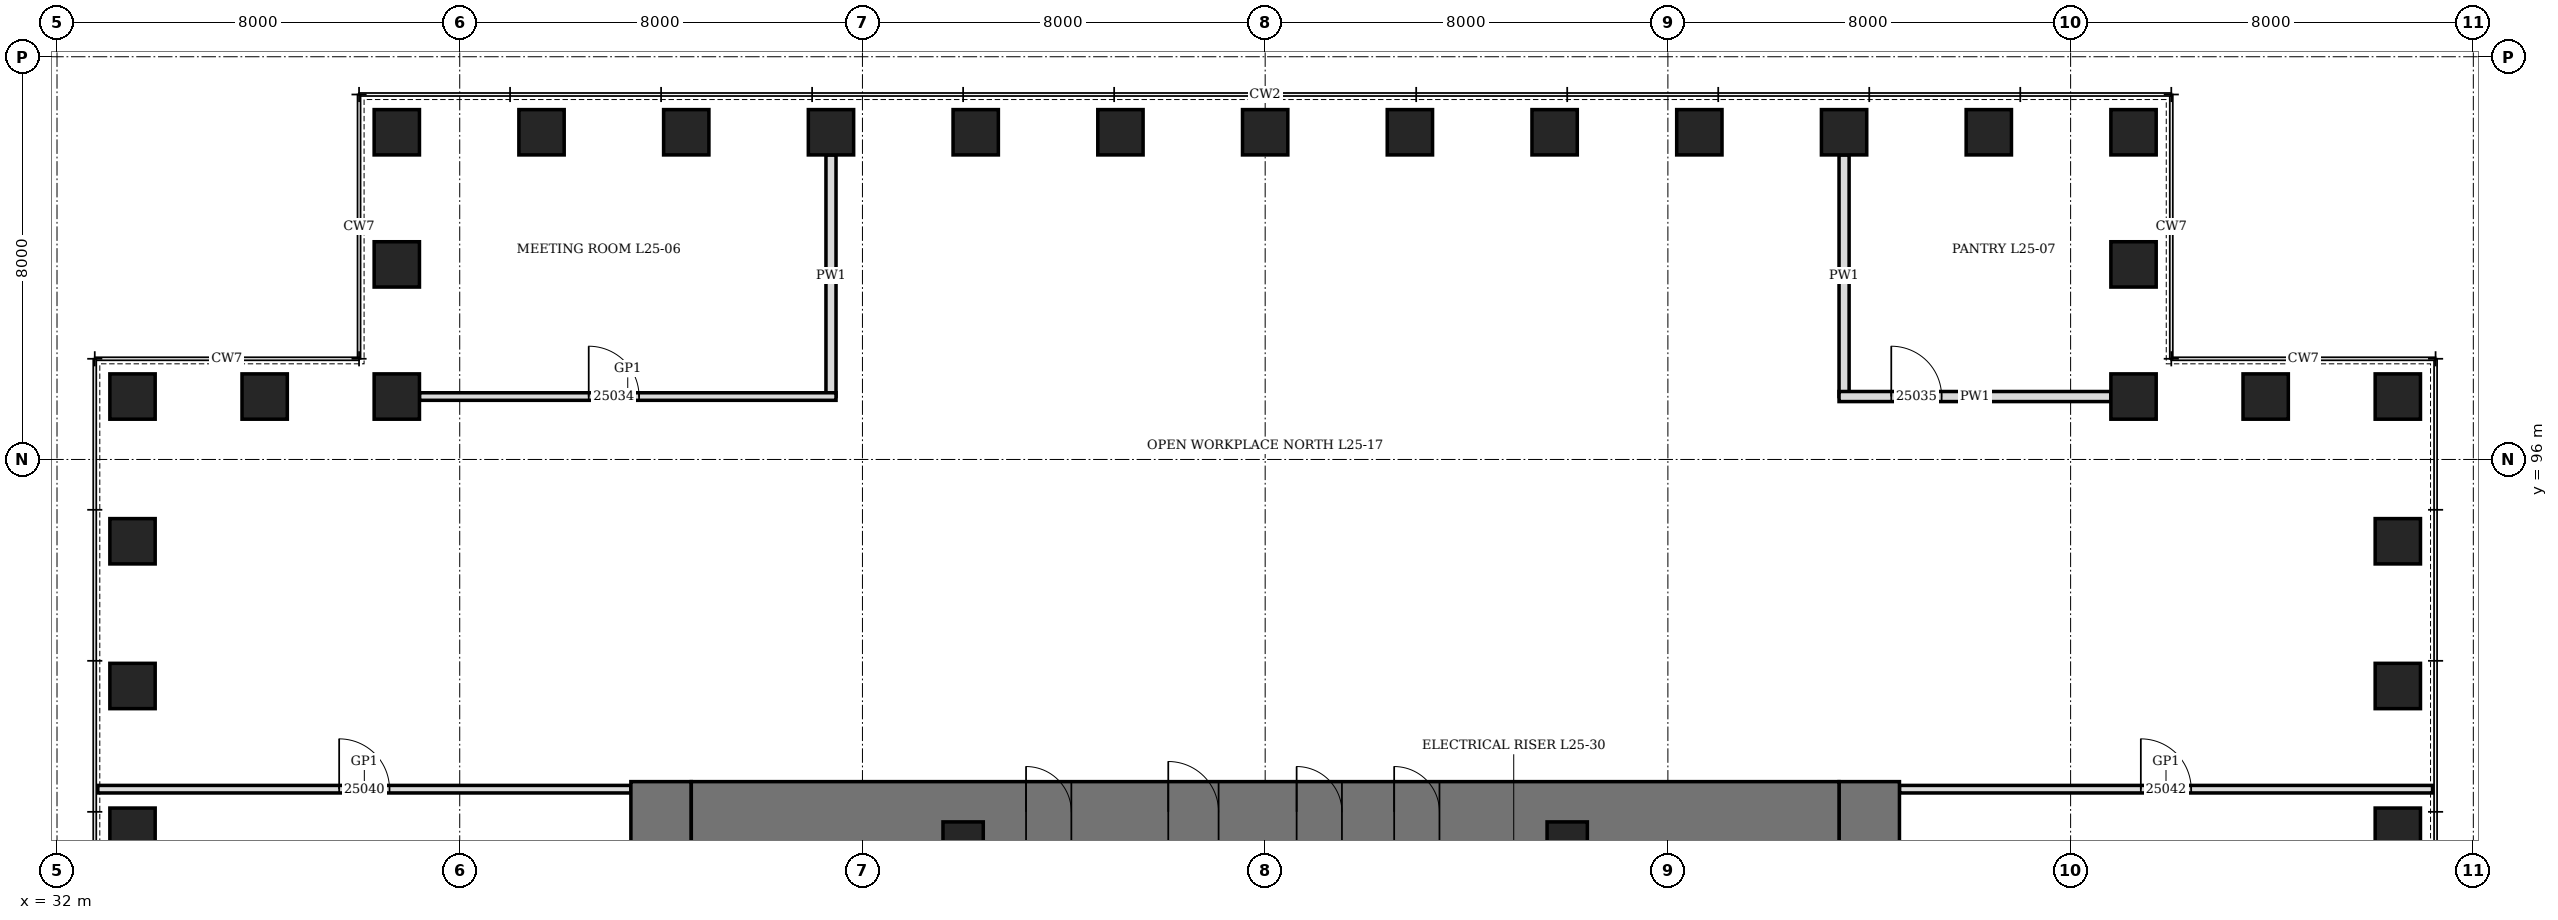
"""IFC4 building model, lengths in metres.
Left out: names, types, materials, properties, quantities, classifications, styles, units other than length and angle.
Written with IfcOpenShell. Run it as: python <this file> out.ifc"""

import sys

from ifc_helpers import new_model, si_unit, direction, frame, frame_2d, origin, origin_2d, place, context, subcontext, project, spatial, rectangle, hollow_rectangle, extrude, element, fill, save


model = new_model("IFC4")
c1 = context("Model", 3, precision=1e-05, world=origin(), true_north=direction((0.0, 1.0)))
c2 = subcontext(c1, "Body", "Model", "MODEL_VIEW")
j1 = project(units=[si_unit("LENGTHUNIT", "METRE"), si_unit("PLANEANGLEUNIT", "RADIAN")], contexts=[c1])
p1 = place(None, origin())
s1 = spatial("IfcSite", under=j1, at=p1, CompositionType="ELEMENT")
p2 = place(p1, origin())
s2 = spatial("IfcBuilding", under=s1, at=p2, CompositionType="ELEMENT")
p3 = place(p2, frame((0.0, 0.0, 116.5)))
s3 = spatial("IfcBuildingStorey", under=s2, at=p3, CompositionType="ELEMENT", Elevation=116.5)
for number, where, z_axis, x_axis in (
    (1, (78.5, 88.625, 0.0), (0.0, 0.0, 1.0), (0.0, 1.0, 0.0)),
    (2, (78.5, 91.5, 0.0), (0.0, 0.0, 1.0), (0.0, 1.0, 0.0)),
    (3, (78.5, 94.375, 0.0), (0.0, 0.0, 1.0), (0.0, 1.0, 0.0)),
    (4, (78.5, 97.25, 0.0), (0.0, 0.0, 1.0), (1.0, 0.0, 0.0)),
    (5, (75.875, 97.25, 0.0), (0.0, 0.0, 1.0), (1.0, 0.0, 0.0)),
    (6, (73.25, 97.25, 0.0), (0.0, 0.0, 1.0), (0.0, 1.0, 0.0)),
    (7, (73.25, 99.875, 0.0), (0.0, 0.0, 1.0), (0.0, 1.0, 0.0)),
    (8, (73.25, 102.5, 0.0), (0.0, 0.0, 1.0), (1.0, 0.0, 0.0)),
    (9, (70.375, 102.5, 0.0), (0.0, 0.0, 1.0), (1.0, 0.0, 0.0)),
    (10, (67.5, 102.5, 0.0), (0.0, 0.0, 1.0), (1.0, 0.0, 0.0)),
    (11, (64.625, 102.5, 0.0), (0.0, 0.0, 1.0), (1.0, 0.0, 0.0)),
    (12, (61.75, 102.5, 0.0), (0.0, 0.0, 1.0), (1.0, 0.0, 0.0)),
    (13, (58.875, 102.5, 0.0), (0.0, 0.0, 1.0), (1.0, 0.0, 0.0)),
    (14, (56.0, 102.5, 0.0), (0.0, 0.0, 1.0), (1.0, 0.0, 0.0)),
    (15, (53.125, 102.5, 0.0), (0.0, 0.0, 1.0), (1.0, 0.0, 0.0)),
    (16, (50.25, 102.5, 0.0), (0.0, 0.0, 1.0), (1.0, 0.0, 0.0)),
    (17, (47.375, 102.5, 0.0), (0.0, 0.0, 1.0), (1.0, 0.0, 0.0)),
    (18, (44.5, 102.5, 0.0), (0.0, 0.0, 1.0), (1.0, 0.0, 0.0)),
    (19, (41.625, 102.5, 0.0), (0.0, 0.0, 1.0), (1.0, 0.0, 0.0)),
    (20, (38.75, 102.5, 0.0), (0.0, 0.0, 1.0), (0.0, 1.0, 0.0)),
    (21, (38.75, 99.875, 0.0), (0.0, 0.0, 1.0), (0.0, 1.0, 0.0)),
    (22, (38.75, 97.25, 0.0), (0.0, 0.0, 1.0), (1.0, 0.0, 0.0)),
    (23, (36.125, 97.25, 0.0), (0.0, 0.0, 1.0), (1.0, 0.0, 0.0)),
    (24, (33.5, 97.25, 0.0), (0.0, 0.0, 1.0), (0.0, 1.0, 0.0)),
    (25, (33.5, 94.375, 0.0), (0.0, 0.0, 1.0), (0.0, 1.0, 0.0)),
    (26, (33.5, 91.5, 0.0), (0.0, 0.0, 1.0), (0.0, 1.0, 0.0)),
    (27, (33.5, 88.625, 0.0), (0.0, 0.0, 1.0), (0.0, 1.0, 0.0)),
):
    element("IfcColumn", number, at=place(p3, frame(where, z_axis=z_axis, x_axis=x_axis)), inside=s3, PredefinedType="COLUMN", context=c2, shape_type="SweptSolid", body=[
        extrude(hollow_rectangle(XDim=0.9, YDim=0.9, WallThickness=0.15, at=origin_2d()), origin(), (0.0, 0.0, 1.0), 4.2),
    ])
p4 = place(p3, frame((44.0, 70.4, 0.0), z_axis=(0.0, 0.0, 1.0), x_axis=(0.0, 1.0, 0.0)))
e28 = element("IfcWall", 28, at=p4, inside=s3, PredefinedType="SHEAR", context=c2, shape_type="SweptSolid", body=[
    extrude(rectangle(XDim=19.2, YDim=1.2, at=frame_2d((9.6, 0.0))), origin(), (0.0, 0.0, 1.0), 4.2),
])
p5 = place(p4, frame((8.6, 0.0, 0.0)))
e29 = element("IfcOpeningElement", 29, at=p5, cuts=e28, PredefinedType="OPENING", context=c2, shape_type="SweptSolid", body=[
    extrude(rectangle(XDim=2.0, YDim=2.4, at=frame_2d((1.0, 1.2))), frame((0.0, 0.61, 0.0), z_axis=(0.0, -1.0, 0.0), x_axis=(1.0, 0.0, 0.0)), (0.0, 0.0, 1.0), 1.22),
])
p6 = place(p3, frame((68.0, 70.4, 0.0), z_axis=(0.0, 0.0, 1.0), x_axis=(0.0, 1.0, 0.0)))
e30 = element("IfcWall", 30, at=p6, inside=s3, PredefinedType="SHEAR", context=c2, shape_type="SweptSolid", body=[
    extrude(rectangle(XDim=19.2, YDim=1.2, at=frame_2d((9.6, 0.0))), origin(), (0.0, 0.0, 1.0), 4.2),
])
p7 = place(p6, frame((8.6, 0.0, 0.0)))
e31 = element("IfcOpeningElement", 31, at=p7, cuts=e30, PredefinedType="OPENING", context=c2, shape_type="SweptSolid", body=[
    extrude(rectangle(XDim=2.0, YDim=2.4, at=frame_2d((1.0, 1.2))), frame((0.0, 0.61, 0.0), z_axis=(0.0, -1.0, 0.0), x_axis=(1.0, 0.0, 0.0)), (0.0, 0.0, 1.0), 1.22),
])
p8 = place(p3, frame((44.6, 89.0, 0.0), z_axis=(0.0, 0.0, 1.0), x_axis=(1.0, 0.0, 0.0)))
e32 = element("IfcWall", 32, at=p8, inside=s3, PredefinedType="SHEAR", context=c2, shape_type="SweptSolid", body=[
    extrude(rectangle(XDim=22.8, YDim=1.2, at=frame_2d((11.4, 0.0))), origin(), (0.0, 0.0, 1.0), 4.2),
])
p9 = place(p8, frame((9.475, 0.0, 0.0)))
e33 = element("IfcOpeningElement", 33, at=p9, cuts=e32, PredefinedType="OPENING", context=c2, shape_type="SweptSolid", body=[
    extrude(rectangle(XDim=1.0, YDim=2.1, at=frame_2d((0.5, 1.05))), frame((0.0, 0.61, 0.0), z_axis=(0.0, -1.0, 0.0), x_axis=(1.0, 0.0, 0.0)), (0.0, 0.0, 1.0), 1.22),
])
p10 = place(p8, frame((6.65, 0.0, 0.0)))
e34 = element("IfcOpeningElement", 34, at=p10, cuts=e32, PredefinedType="OPENING", context=c2, shape_type="SweptSolid", body=[
    extrude(rectangle(XDim=0.9, YDim=2.1, at=frame_2d((0.45, 1.05))), frame((0.0, 0.61, 0.0), z_axis=(0.0, -1.0, 0.0), x_axis=(1.0, 0.0, 0.0)), (0.0, 0.0, 1.0), 1.22),
])
p11 = place(p8, frame((12.025, 0.0, 0.0)))
e35 = element("IfcOpeningElement", 35, at=p11, cuts=e32, PredefinedType="OPENING", context=c2, shape_type="SweptSolid", body=[
    extrude(rectangle(XDim=0.9, YDim=2.1, at=frame_2d((0.45, 1.05))), frame((0.0, 0.61, 0.0), z_axis=(0.0, -1.0, 0.0), x_axis=(1.0, 0.0, 0.0)), (0.0, 0.0, 1.0), 1.22),
])
p12 = place(p8, frame((13.962, 0.0, 0.0)))
e36 = element("IfcOpeningElement", 36, at=p12, cuts=e32, PredefinedType="OPENING", context=c2, shape_type="SweptSolid", body=[
    extrude(rectangle(XDim=0.9, YDim=2.1, at=frame_2d((0.45, 1.05))), frame((0.0, 0.61, 0.0), z_axis=(0.0, -1.0, 0.0), x_axis=(1.0, 0.0, 0.0)), (0.0, 0.0, 1.0), 1.22),
])
for number, where, z_axis, x_axis in (
    (37, (50.0, 88.4, 0.0), (0.0, 0.0, 1.0), (1.0, 0.0, 0.0)),
    (38, (62.0, 88.4, 0.0), (0.0, 0.0, 1.0), (1.0, 0.0, 0.0)),
):
    element("IfcColumn", number, at=place(p3, frame(where, z_axis=z_axis, x_axis=x_axis)), inside=s3, PredefinedType="COLUMN", context=c2, shape_type="SweptSolid", body=[
        extrude(hollow_rectangle(XDim=0.8, YDim=0.8, WallThickness=0.1, at=origin_2d()), origin(), (0.0, 0.0, 1.0), 4.2),
    ])
p13 = place(p3, frame((47.375, 97.25, 0.0), z_axis=(0.0, 0.0, 1.0), x_axis=(0.0, 1.0, 0.0)))
e39 = element("IfcWall", 39, at=p13, inside=s3, PredefinedType="PARTITIONING", context=c2, shape_type="SweptSolid", body=[
    extrude(rectangle(XDim=4.8, YDim=0.2, at=frame_2d((2.4, 0.0))), origin(), (0.0, 0.0, 1.0), 3.278),
])
p14 = place(p3, frame((67.5, 97.25, 0.0), z_axis=(0.0, 0.0, 1.0), x_axis=(0.0, 1.0, 0.0)))
e40 = element("IfcWall", 40, at=p14, inside=s3, PredefinedType="PARTITIONING", context=c2, shape_type="SweptSolid", body=[
    extrude(rectangle(XDim=4.8, YDim=0.2, at=frame_2d((2.4, 0.0))), origin(), (0.0, 0.0, 1.0), 2.74),
])
p15 = place(p3, frame((32.81, 89.45, 0.0), z_axis=(0.0, 0.0, 1.0), x_axis=(1.0, 0.0, 0.0)))
e41 = element("IfcWall", 41, at=p15, inside=s3, PredefinedType="PARTITIONING", context=c2, shape_type="SweptSolid", body=[
    extrude(rectangle(XDim=10.59, YDim=0.15, at=frame_2d((5.295, 0.0))), origin(), (0.0, 0.0, 1.0), 4.04),
])
p16 = place(p15, frame((4.795, 0.0, 0.0)))
e42 = element("IfcOpeningElement", 42, at=p16, cuts=e41, PredefinedType="OPENING", context=c2, shape_type="SweptSolid", body=[
    extrude(rectangle(XDim=1.0, YDim=2.4, at=frame_2d((0.5, 1.2))), frame((0.0, 0.085, 0.0), z_axis=(0.0, -1.0, 0.0), x_axis=(1.0, 0.0, 0.0)), (0.0, 0.0, 1.0), 0.17),
])
p17 = place(p3, frame((68.6, 89.45, 0.0), z_axis=(0.0, 0.0, 1.0), x_axis=(1.0, 0.0, 0.0)))
e43 = element("IfcWall", 43, at=p17, inside=s3, PredefinedType="PARTITIONING", context=c2, shape_type="SweptSolid", body=[
    extrude(rectangle(XDim=10.59, YDim=0.15, at=frame_2d((5.295, 0.0))), origin(), (0.0, 0.0, 1.0), 4.04),
])
p18 = place(p17, frame((4.795, 0.0, 0.0)))
e44 = element("IfcOpeningElement", 44, at=p18, cuts=e43, PredefinedType="OPENING", context=c2, shape_type="SweptSolid", body=[
    extrude(rectangle(XDim=1.0, YDim=2.4, at=frame_2d((0.5, 1.2))), frame((0.0, 0.085, 0.0), z_axis=(0.0, -1.0, 0.0), x_axis=(1.0, 0.0, 0.0)), (0.0, 0.0, 1.0), 0.17),
])
p19 = place(p3, frame((39.2, 97.25, 0.0), z_axis=(0.0, 0.0, 1.0), x_axis=(1.0, 0.0, 0.0)))
e45 = element("IfcWall", 45, at=p19, inside=s3, PredefinedType="PARTITIONING", context=c2, shape_type="SweptSolid", body=[
    extrude(rectangle(XDim=8.275, YDim=0.15, at=frame_2d((4.138, 0.0))), origin(), (0.0, 0.0, 1.0), 4.04),
])
p20 = place(p19, frame((3.363, 0.0, 0.0)))
e46 = element("IfcOpeningElement", 46, at=p20, cuts=e45, PredefinedType="OPENING", context=c2, shape_type="SweptSolid", body=[
    extrude(rectangle(XDim=1.0, YDim=2.4, at=frame_2d((0.5, 1.2))), frame((0.0, 0.085, 0.0), z_axis=(0.0, -1.0, 0.0), x_axis=(1.0, 0.0, 0.0)), (0.0, 0.0, 1.0), 0.17),
])
p21 = place(p3, frame((67.4, 97.25, 0.0), z_axis=(0.0, 0.0, 1.0), x_axis=(1.0, 0.0, 0.0)))
e47 = element("IfcWall", 47, at=p21, inside=s3, PredefinedType="PARTITIONING", context=c2, shape_type="SweptSolid", body=[
    extrude(rectangle(XDim=5.4, YDim=0.2, at=frame_2d((2.7, 0.0))), origin(), (0.0, 0.0, 1.0), 4.04),
])
p22 = place(p21, frame((1.038, 0.0, 0.0)))
e48 = element("IfcOpeningElement", 48, at=p22, cuts=e47, PredefinedType="OPENING", context=c2, shape_type="SweptSolid", body=[
    extrude(rectangle(XDim=1.0, YDim=2.1, at=frame_2d((0.5, 1.05))), frame((0.0, 0.11, 0.0), z_axis=(0.0, -1.0, 0.0), x_axis=(1.0, 0.0, 0.0)), (0.0, 0.0, 1.0), 0.22),
])
p23 = place(p9, origin())
e49 = element("IfcDoor", 49, at=p23, inside=s3, OperationType="SINGLE_SWING_LEFT", PredefinedType="DOOR", context=c2, shape_type="SweptSolid", body=[
    extrude(rectangle(XDim=1.0, YDim=2.1, at=frame_2d((0.5, 1.05))), frame((0.0, 0.35, 0.0), z_axis=(0.0, -1.0, 0.0), x_axis=(1.0, 0.0, 0.0)), (0.0, 0.0, 1.0), 0.7),
])
fill(e33, e49)
p24 = place(p10, origin())
e50 = element("IfcDoor", 50, at=p24, inside=s3, OperationType="SINGLE_SWING_LEFT", PredefinedType="DOOR", context=c2, shape_type="SweptSolid", body=[
    extrude(rectangle(XDim=0.9, YDim=2.1, at=frame_2d((0.45, 1.05))), frame((0.0, 0.35, 0.0), z_axis=(0.0, -1.0, 0.0), x_axis=(1.0, 0.0, 0.0)), (0.0, 0.0, 1.0), 0.7),
])
fill(e34, e50)
p25 = place(p11, origin())
e51 = element("IfcDoor", 51, at=p25, inside=s3, OperationType="SINGLE_SWING_LEFT", PredefinedType="DOOR", context=c2, shape_type="SweptSolid", body=[
    extrude(rectangle(XDim=0.9, YDim=2.1, at=frame_2d((0.45, 1.05))), frame((0.0, 0.35, 0.0), z_axis=(0.0, -1.0, 0.0), x_axis=(1.0, 0.0, 0.0)), (0.0, 0.0, 1.0), 0.7),
])
fill(e35, e51)
p26 = place(p12, origin())
e52 = element("IfcDoor", 52, at=p26, inside=s3, OperationType="SINGLE_SWING_LEFT", PredefinedType="DOOR", context=c2, shape_type="SweptSolid", body=[
    extrude(rectangle(XDim=0.9, YDim=2.1, at=frame_2d((0.45, 1.05))), frame((0.0, 0.35, 0.0), z_axis=(0.0, -1.0, 0.0), x_axis=(1.0, 0.0, 0.0)), (0.0, 0.0, 1.0), 0.7),
])
fill(e36, e52)
p27 = place(p20, origin())
e53 = element("IfcDoor", 53, at=p27, inside=s3, OperationType="SINGLE_SWING_RIGHT", PredefinedType="DOOR", context=c2, shape_type="SweptSolid", body=[
    extrude(rectangle(XDim=1.0, YDim=2.4, at=frame_2d((0.5, 1.2))), frame((0.0, 0.075, 0.0), z_axis=(0.0, -1.0, 0.0), x_axis=(1.0, 0.0, 0.0)), (0.0, 0.0, 1.0), 0.149),
])
fill(e46, e53)
p28 = place(p22, origin())
e54 = element("IfcDoor", 54, at=p28, inside=s3, OperationType="SINGLE_SWING_LEFT", PredefinedType="DOOR", context=c2, shape_type="SweptSolid", body=[
    extrude(rectangle(XDim=1.0, YDim=2.1, at=frame_2d((0.5, 1.05))), frame((0.0, 0.1, 0.0), z_axis=(0.0, -1.0, 0.0), x_axis=(1.0, 0.0, 0.0)), (0.0, 0.0, 1.0), 0.199),
])
fill(e48, e54)
p29 = place(p16, origin())
e55 = element("IfcDoor", 55, at=p29, inside=s3, OperationType="SINGLE_SWING_RIGHT", PredefinedType="DOOR", context=c2, shape_type="SweptSolid", body=[
    extrude(rectangle(XDim=1.0, YDim=2.4, at=frame_2d((0.5, 1.2))), frame((0.0, 0.075, 0.0), z_axis=(0.0, -1.0, 0.0), x_axis=(1.0, 0.0, 0.0)), (0.0, 0.0, 1.0), 0.149),
])
fill(e42, e55)
p30 = place(p18, origin())
e56 = element("IfcDoor", 56, at=p30, inside=s3, OperationType="SINGLE_SWING_RIGHT", PredefinedType="DOOR", context=c2, shape_type="SweptSolid", body=[
    extrude(rectangle(XDim=1.0, YDim=2.4, at=frame_2d((0.5, 1.2))), frame((0.0, 0.075, 0.0), z_axis=(0.0, -1.0, 0.0), x_axis=(1.0, 0.0, 0.0)), (0.0, 0.0, 1.0), 0.149),
])
fill(e44, e56)
save(model, sys.argv[1])
